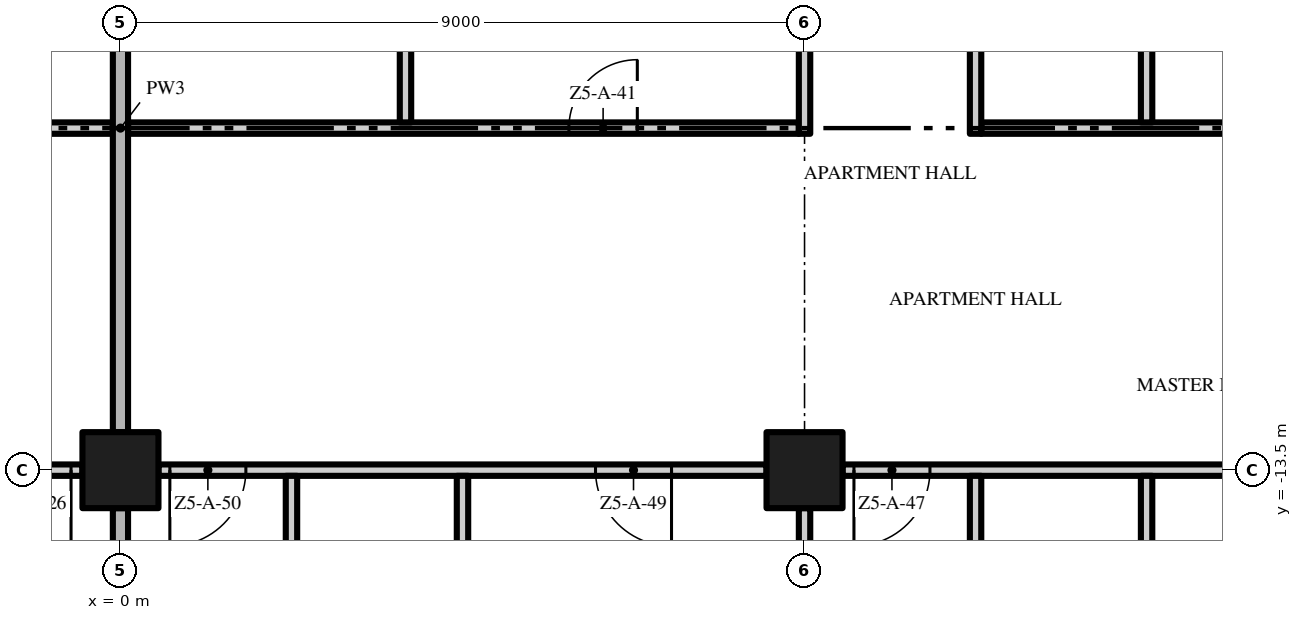
"""IFC4 building model, lengths in metres.
Left out: names, types, materials, properties, quantities, classifications, styles, units other than length and angle.
Written with IfcOpenShell. Run it as: python <this file> out.ifc"""

import sys

from ifc_helpers import new_model, si_unit, direction, frame, frame_2d, origin, origin_2d, place, context, subcontext, project, spatial, rectangle, extrude, element, fill, save


model = new_model("IFC4")
c1 = context("Model", 3, precision=1e-05, world=origin(), true_north=direction((0.0, 1.0)))
c2 = subcontext(c1, "Body", "Model", "MODEL_VIEW")
j1 = project(units=[si_unit("LENGTHUNIT", "METRE"), si_unit("PLANEANGLEUNIT", "RADIAN")], contexts=[c1])
p1 = place(None, origin())
s1 = spatial("IfcSite", under=j1, at=p1, CompositionType="ELEMENT")
p2 = place(p1, origin())
s2 = spatial("IfcBuilding", under=s1, at=p2, CompositionType="ELEMENT")
p3 = place(p2, frame((0.0, 0.0, 238.8)))
s3 = spatial("IfcBuildingStorey", under=s2, at=p3, CompositionType="ELEMENT", Elevation=238.8)
for number, where, z_axis, x_axis in (
    (1, (0.0, -13.5, 0.0), (0.0, 0.0, 1.0), (1.0, 0.0, 0.0)),
    (2, (9.0, -13.5, 0.0), (0.0, 0.0, 1.0), (1.0, 0.0, 0.0)),
):
    element("IfcColumn", number, at=place(p3, frame(where, z_axis=z_axis, x_axis=x_axis)), inside=s3, PredefinedType="COLUMN", context=c2, shape_type="SweptSolid", body=[
        extrude(rectangle(XDim=1.0, YDim=1.0, at=origin_2d()), origin(), (0.0, 0.0, 1.0), 3.5),
    ])
p4 = place(p3, frame((-0.5, -13.5, 0.0), z_axis=(0.0, 0.0, 1.0), x_axis=(-1.0, 0.0, 0.0)))
e3 = element("IfcWall", 3, at=p4, inside=s3, PredefinedType="PARTITIONING", context=c2, shape_type="SweptSolid", body=[
    extrude(rectangle(XDim=8.0, YDim=0.15, at=frame_2d((4.0, 0.0))), origin(), (0.0, 0.0, 1.0), 3.5),
])
p5 = place(p4, frame((0.15, 0.0, 0.0)))
e4 = element("IfcOpeningElement", 4, at=p5, cuts=e3, PredefinedType="OPENING", context=c2, shape_type="SweptSolid", body=[
    extrude(rectangle(XDim=1.0, YDim=2.4, at=frame_2d((0.5, 1.2))), frame((0.0, 0.085, 0.0), z_axis=(0.0, -1.0, 0.0), x_axis=(1.0, 0.0, 0.0)), (0.0, 0.0, 1.0), 0.17),
])
p6 = place(p4, frame((6.85, 0.0, 0.0)))
e5 = element("IfcOpeningElement", 5, at=p6, cuts=e3, PredefinedType="OPENING", context=c2, shape_type="SweptSolid", body=[
    extrude(rectangle(XDim=1.0, YDim=2.4, at=frame_2d((0.5, 1.2))), frame((0.0, 0.085, 0.0), z_axis=(0.0, -1.0, 0.0), x_axis=(1.0, 0.0, 0.0)), (0.0, 0.0, 1.0), 0.17),
])
p7 = place(p3, frame((8.5, -13.5, 0.0), z_axis=(0.0, 0.0, 1.0), x_axis=(-1.0, 0.0, 0.0)))
e6 = element("IfcWall", 6, at=p7, inside=s3, PredefinedType="PARTITIONING", context=c2, shape_type="SweptSolid", body=[
    extrude(rectangle(XDim=8.0, YDim=0.15, at=frame_2d((4.0, 0.0))), origin(), (0.0, 0.0, 1.0), 3.5),
])
p8 = place(p7, frame((1.25, 0.0, 0.0)))
e7 = element("IfcOpeningElement", 7, at=p8, cuts=e6, PredefinedType="OPENING", context=c2, shape_type="SweptSolid", body=[
    extrude(rectangle(XDim=1.0, YDim=2.4, at=frame_2d((0.5, 1.2))), frame((0.0, 0.085, 0.0), z_axis=(0.0, -1.0, 0.0), x_axis=(1.0, 0.0, 0.0)), (0.0, 0.0, 1.0), 0.17),
])
p9 = place(p7, frame((6.85, 0.0, 0.0)))
e8 = element("IfcOpeningElement", 8, at=p9, cuts=e6, PredefinedType="OPENING", context=c2, shape_type="SweptSolid", body=[
    extrude(rectangle(XDim=1.0, YDim=2.4, at=frame_2d((0.5, 1.2))), frame((0.0, 0.085, 0.0), z_axis=(0.0, -1.0, 0.0), x_axis=(1.0, 0.0, 0.0)), (0.0, 0.0, 1.0), 0.17),
])
p10 = place(p3, frame((17.5, -13.5, 0.0), z_axis=(0.0, 0.0, 1.0), x_axis=(-1.0, 0.0, 0.0)))
e9 = element("IfcWall", 9, at=p10, inside=s3, PredefinedType="PARTITIONING", context=c2, shape_type="SweptSolid", body=[
    extrude(rectangle(XDim=8.0, YDim=0.15, at=frame_2d((4.0, 0.0))), origin(), (0.0, 0.0, 1.0), 3.5),
])
p11 = place(p10, frame((0.15, 0.0, 0.0)))
e10 = element("IfcOpeningElement", 10, at=p11, cuts=e9, PredefinedType="OPENING", context=c2, shape_type="SweptSolid", body=[
    extrude(rectangle(XDim=1.0, YDim=2.4, at=frame_2d((0.5, 1.2))), frame((0.0, 0.085, 0.0), z_axis=(0.0, -1.0, 0.0), x_axis=(1.0, 0.0, 0.0)), (0.0, 0.0, 1.0), 0.17),
])
p12 = place(p10, frame((6.85, 0.0, 0.0)))
e11 = element("IfcOpeningElement", 11, at=p12, cuts=e9, PredefinedType="OPENING", context=c2, shape_type="SweptSolid", body=[
    extrude(rectangle(XDim=1.0, YDim=2.4, at=frame_2d((0.5, 1.2))), frame((0.0, 0.085, 0.0), z_axis=(0.0, -1.0, 0.0), x_axis=(1.0, 0.0, 0.0)), (0.0, 0.0, 1.0), 0.17),
])
p13 = place(p3, frame((-11.625, -9.0, 0.0), z_axis=(0.0, 0.0, 1.0), x_axis=(1.0, 0.0, 0.0)))
e12 = element("IfcWall", 12, at=p13, inside=s3, PredefinedType="PARTITIONING", context=c2, shape_type="SweptSolid", body=[
    extrude(rectangle(XDim=11.525, YDim=0.15, at=frame_2d((5.763, 0.0))), origin(), (0.0, 0.0, 1.0), 3.5),
])
p14 = place(p13, frame((4.675, 0.0, 0.0)))
e13 = element("IfcOpeningElement", 13, at=p14, cuts=e12, PredefinedType="OPENING", context=c2, shape_type="SweptSolid", body=[
    extrude(rectangle(XDim=1.0, YDim=2.4, at=frame_2d((0.5, 1.2))), frame((0.0, 0.085, 0.0), z_axis=(0.0, -1.0, 0.0), x_axis=(1.0, 0.0, 0.0)), (0.0, 0.0, 1.0), 0.17),
])
p15 = place(p3, frame((0.1, -9.0, 0.0), z_axis=(0.0, 0.0, 1.0), x_axis=(1.0, 0.0, 0.0)))
e14 = element("IfcWall", 14, at=p15, inside=s3, PredefinedType="PARTITIONING", context=c2, shape_type="SweptSolid", body=[
    extrude(rectangle(XDim=8.825, YDim=0.15, at=frame_2d((4.412, 0.0))), origin(), (0.0, 0.0, 1.0), 3.5),
])
p16 = place(p15, frame((5.8, 0.0, 0.0)))
e15 = element("IfcOpeningElement", 15, at=p16, cuts=e14, PredefinedType="OPENING", context=c2, shape_type="SweptSolid", body=[
    extrude(rectangle(XDim=0.9, YDim=2.1, at=frame_2d((0.45, 1.05))), frame((0.0, 0.085, 0.0), z_axis=(0.0, -1.0, 0.0), x_axis=(1.0, 0.0, 0.0)), (0.0, 0.0, 1.0), 0.17),
])
p17 = place(p3, frame((11.325, -9.0, 0.0), z_axis=(0.0, 0.0, 1.0), x_axis=(1.0, 0.0, 0.0)))
e16 = element("IfcWall", 16, at=p17, inside=s3, PredefinedType="PARTITIONING", context=c2, shape_type="SweptSolid", body=[
    extrude(rectangle(XDim=15.375, YDim=0.15, at=frame_2d((7.688, 0.0))), origin(), (0.0, 0.0, 1.0), 3.5),
])
p18 = place(p17, frame((14.375, 0.0, 0.0)))
e17 = element("IfcOpeningElement", 17, at=p18, cuts=e16, PredefinedType="OPENING", context=c2, shape_type="SweptSolid", body=[
    extrude(rectangle(XDim=0.8, YDim=2.0, at=frame_2d((0.4, 1.0))), frame((0.0, 0.085, 0.0), z_axis=(0.0, -1.0, 0.0), x_axis=(1.0, 0.0, 0.0)), (0.0, 0.0, 1.0), 0.17),
])
p19 = place(p3, frame((0.0, -21.6, 0.0), z_axis=(0.0, 0.0, 1.0), x_axis=(0.0, 1.0, 0.0)))
e18 = element("IfcWall", 18, at=p19, inside=s3, PredefinedType="PARTITIONING", context=c2, shape_type="SweptSolid", body=[
    extrude(rectangle(XDim=7.6, YDim=0.2, at=frame_2d((3.8, 0.0))), origin(), (0.0, 0.0, 1.0), 3.5),
])
p20 = place(p3, frame((0.0, -13.0, 0.0), z_axis=(0.0, 0.0, 1.0), x_axis=(0.0, 1.0, 0.0)))
e19 = element("IfcWall", 19, at=p20, inside=s3, PredefinedType="PARTITIONING", context=c2, shape_type="SweptSolid", body=[
    extrude(rectangle(XDim=8.0, YDim=0.2, at=frame_2d((4.0, 0.0))), origin(), (0.0, 0.0, 1.0), 3.5),
])
p21 = place(p3, frame((2.25, -16.575, 0.0), z_axis=(0.0, 0.0, 1.0), x_axis=(0.0, 1.0, 0.0)))
e20 = element("IfcWall", 20, at=p21, inside=s3, PredefinedType="PARTITIONING", context=c2, shape_type="SweptSolid", body=[
    extrude(rectangle(XDim=3.0, YDim=0.15, at=frame_2d((1.5, 0.0))), origin(), (0.0, 0.0, 1.0), 3.5),
])
p22 = place(p3, frame((3.75, -8.925, 0.0), z_axis=(0.0, 0.0, 1.0), x_axis=(0.0, 1.0, 0.0)))
e21 = element("IfcWall", 21, at=p22, inside=s3, PredefinedType="PARTITIONING", context=c2, shape_type="SweptSolid", body=[
    extrude(rectangle(XDim=4.35, YDim=0.15, at=frame_2d((2.175, 0.0))), origin(), (0.0, 0.0, 1.0), 3.5),
])
p23 = place(p22, frame((1.75, 0.0, 0.0)))
e22 = element("IfcOpeningElement", 22, at=p23, cuts=e21, PredefinedType="OPENING", context=c2, shape_type="SweptSolid", body=[
    extrude(rectangle(XDim=0.9, YDim=2.1, at=frame_2d((0.45, 1.05))), frame((0.0, 0.085, 0.0), z_axis=(0.0, -1.0, 0.0), x_axis=(1.0, 0.0, 0.0)), (0.0, 0.0, 1.0), 0.17),
])
p24 = place(p3, frame((4.5, -22.2, 0.0), z_axis=(0.0, 0.0, 1.0), x_axis=(0.0, 1.0, 0.0)))
e23 = element("IfcWall", 23, at=p24, inside=s3, PredefinedType="PARTITIONING", context=c2, shape_type="SweptSolid", body=[
    extrude(rectangle(XDim=8.625, YDim=0.15, at=frame_2d((4.312, 0.0))), origin(), (0.0, 0.0, 1.0), 3.5),
])
p25 = place(p3, frame((9.0, -21.6, 0.0), z_axis=(0.0, 0.0, 1.0), x_axis=(0.0, 1.0, 0.0)))
e24 = element("IfcWall", 24, at=p25, inside=s3, PredefinedType="PARTITIONING", context=c2, shape_type="SweptSolid", body=[
    extrude(rectangle(XDim=7.6, YDim=0.15, at=frame_2d((3.8, 0.0))), origin(), (0.0, 0.0, 1.0), 3.5),
])
p26 = place(p3, frame((9.0, -9.075, 0.0), z_axis=(0.0, 0.0, 1.0), x_axis=(0.0, 1.0, 0.0)))
e25 = element("IfcWall", 25, at=p26, inside=s3, PredefinedType="PARTITIONING", context=c2, shape_type="SweptSolid", body=[
    extrude(rectangle(XDim=4.075, YDim=0.15, at=frame_2d((2.038, 0.0))), origin(), (0.0, 0.0, 1.0), 3.5),
])
p27 = place(p3, frame((11.25, -16.575, 0.0), z_axis=(0.0, 0.0, 1.0), x_axis=(0.0, 1.0, 0.0)))
e26 = element("IfcWall", 26, at=p27, inside=s3, PredefinedType="PARTITIONING", context=c2, shape_type="SweptSolid", body=[
    extrude(rectangle(XDim=3.0, YDim=0.15, at=frame_2d((1.5, 0.0))), origin(), (0.0, 0.0, 1.0), 3.5),
])
p28 = place(p3, frame((11.25, -4.425, 0.0), z_axis=(0.0, 0.0, 1.0), x_axis=(0.0, -1.0, 0.0)))
e27 = element("IfcWall", 27, at=p28, inside=s3, PredefinedType="PARTITIONING", context=c2, shape_type="SweptSolid", body=[
    extrude(rectangle(XDim=4.65, YDim=0.15, at=frame_2d((2.325, 0.0))), origin(), (0.0, 0.0, 1.0), 3.5),
])
p29 = place(p28, frame((1.875, 0.0, 0.0)))
e28 = element("IfcOpeningElement", 28, at=p29, cuts=e27, PredefinedType="OPENING", context=c2, shape_type="SweptSolid", body=[
    extrude(rectangle(XDim=0.9, YDim=2.1, at=frame_2d((0.45, 1.05))), frame((0.0, 0.085, 0.0), z_axis=(0.0, -1.0, 0.0), x_axis=(1.0, 0.0, 0.0)), (0.0, 0.0, 1.0), 0.17),
])
p30 = place(p3, frame((13.5, -22.2, 0.0), z_axis=(0.0, 0.0, 1.0), x_axis=(0.0, 1.0, 0.0)))
e29 = element("IfcWall", 29, at=p30, inside=s3, PredefinedType="PARTITIONING", context=c2, shape_type="SweptSolid", body=[
    extrude(rectangle(XDim=8.625, YDim=0.15, at=frame_2d((4.312, 0.0))), origin(), (0.0, 0.0, 1.0), 3.5),
])
p31 = place(p3, frame((13.5, -8.925, 0.0), z_axis=(0.0, 0.0, 1.0), x_axis=(0.0, 1.0, 0.0)))
e30 = element("IfcWall", 30, at=p31, inside=s3, PredefinedType="PARTITIONING", context=c2, shape_type="SweptSolid", body=[
    extrude(rectangle(XDim=4.35, YDim=0.15, at=frame_2d((2.175, 0.0))), origin(), (0.0, 0.0, 1.0), 3.5),
])
p32 = place(p5, origin())
e31 = element("IfcDoor", 31, at=p32, inside=s3, OperationType="SINGLE_SWING_LEFT", PredefinedType="DOOR", context=c2, shape_type="SweptSolid", body=[
    extrude(rectangle(XDim=1.0, YDim=2.4, at=frame_2d((0.5, 1.2))), frame((0.0, 0.025, 0.0), z_axis=(0.0, -1.0, 0.0), x_axis=(1.0, 0.0, 0.0)), (0.0, 0.0, 1.0), 0.05),
])
fill(e4, e31)
p33 = place(p16, origin())
e32 = element("IfcDoor", 32, at=p33, inside=s3, OperationType="SINGLE_SWING_RIGHT", PredefinedType="DOOR", context=c2, shape_type="SweptSolid", body=[
    extrude(rectangle(XDim=0.9, YDim=2.1, at=frame_2d((0.45, 1.05))), frame((0.0, 0.025, 0.0), z_axis=(0.0, -1.0, 0.0), x_axis=(1.0, 0.0, 0.0)), (0.0, 0.0, 1.0), 0.05),
])
fill(e15, e32)
p34 = place(p12, origin())
e33 = element("IfcDoor", 33, at=p34, inside=s3, OperationType="SINGLE_SWING_RIGHT", PredefinedType="DOOR", context=c2, shape_type="SweptSolid", body=[
    extrude(rectangle(XDim=1.0, YDim=2.4, at=frame_2d((0.5, 1.2))), frame((0.0, 0.025, 0.0), z_axis=(0.0, -1.0, 0.0), x_axis=(1.0, 0.0, 0.0)), (0.0, 0.0, 1.0), 0.05),
])
fill(e11, e33)
p35 = place(p8, origin())
e34 = element("IfcDoor", 34, at=p35, inside=s3, OperationType="SINGLE_SWING_LEFT", PredefinedType="DOOR", context=c2, shape_type="SweptSolid", body=[
    extrude(rectangle(XDim=1.0, YDim=2.4, at=frame_2d((0.5, 1.2))), frame((0.0, 0.025, 0.0), z_axis=(0.0, -1.0, 0.0), x_axis=(1.0, 0.0, 0.0)), (0.0, 0.0, 1.0), 0.05),
])
fill(e7, e34)
p36 = place(p9, origin())
e35 = element("IfcDoor", 35, at=p36, inside=s3, OperationType="SINGLE_SWING_RIGHT", PredefinedType="DOOR", context=c2, shape_type="SweptSolid", body=[
    extrude(rectangle(XDim=1.0, YDim=2.4, at=frame_2d((0.5, 1.2))), frame((0.0, 0.025, 0.0), z_axis=(0.0, -1.0, 0.0), x_axis=(1.0, 0.0, 0.0)), (0.0, 0.0, 1.0), 0.05),
])
fill(e8, e35)
save(model, sys.argv[1])
